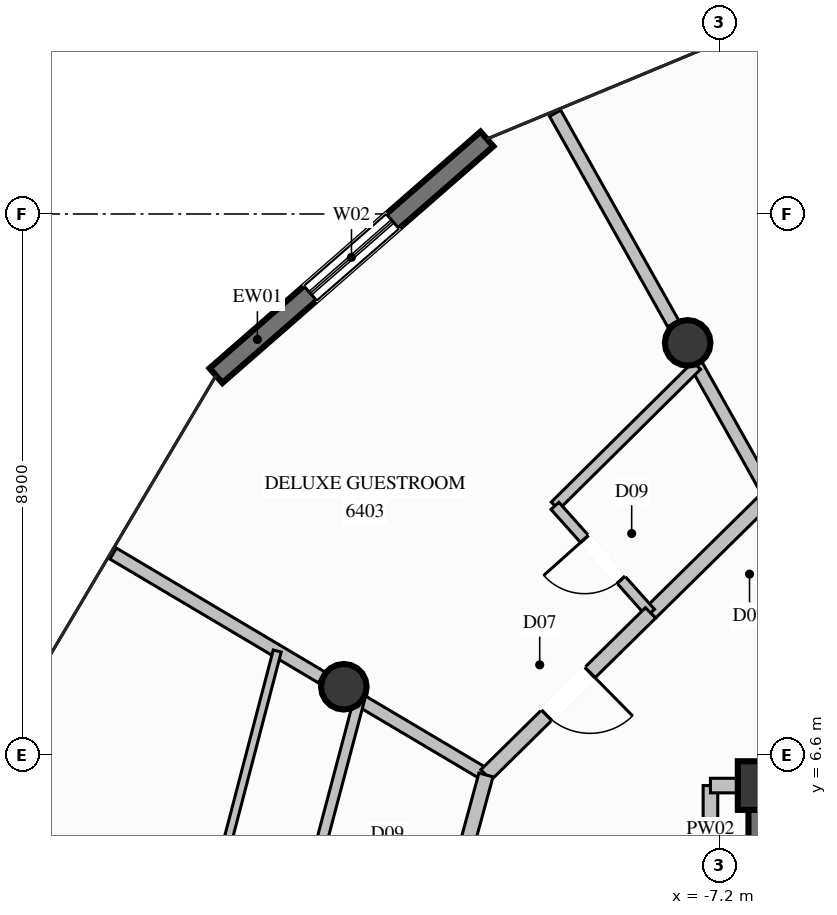
"""IFC4 building model, lengths in metres.
Left out: names, types, materials, properties, quantities, classifications, styles, units other than length and angle.
Written with IfcOpenShell. Run it as: python <this file> out.ifc"""

import sys

from ifc_helpers import new_model, si_unit, direction, frame, frame_2d, origin, origin_2d, place, context, subcontext, project, spatial, rectangle, circle, extrude, element, fill, save


model = new_model("IFC4")
c1 = context("Model", 3, precision=1e-05, world=origin(), true_north=direction((0.0, 1.0)))
c2 = subcontext(c1, "Body", "Model", "MODEL_VIEW")
j1 = project(units=[si_unit("LENGTHUNIT", "METRE"), si_unit("PLANEANGLEUNIT", "RADIAN")], contexts=[c1])
p1 = place(None, origin())
s1 = spatial("IfcSite", under=j1, at=p1, CompositionType="ELEMENT")
p2 = place(p1, origin())
s2 = spatial("IfcBuilding", under=s1, at=p2, CompositionType="ELEMENT")
p3 = place(p2, frame((0.0, 0.0, 239.2)))
s3 = spatial("IfcBuildingStorey", under=s2, at=p3, CompositionType="ELEMENT", Elevation=239.2)
p4 = place(p3, frame((-6.5, 6.1, 0.0), z_axis=(0.0, 0.0, 1.0), x_axis=(1.0, 0.0, 0.0)))
e1 = element("IfcColumn", 1, at=p4, inside=s3, PredefinedType="COLUMN", context=c2, shape_type="SweptSolid", body=[
    extrude(rectangle(XDim=0.8, YDim=0.8, at=origin_2d()), origin(), (0.0, 0.0, 1.0), 3.8),
])
p5 = place(p3, frame((-6.5, 2.35, 0.0), z_axis=(0.0, 0.0, 1.0), x_axis=(0.0, 1.0, 0.0)))
e2 = element("IfcWall", 2, at=p5, inside=s3, PredefinedType="SHEAR", context=c2, shape_type="SweptSolid", body=[
    extrude(rectangle(XDim=3.975, YDim=0.45, at=frame_2d((1.987, 0.0))), origin(), (0.0, 0.0, 1.0), 3.8),
])
for number, where, z_axis, x_axis in (
    (3, (-7.725, 13.38, 0.0), (0.0, 0.0, 1.0), (1.0, 0.0, 0.0)),
    (4, (-13.38, 7.725, 0.0), (0.0, 0.0, 1.0), (1.0, 0.0, 0.0)),
):
    element("IfcColumn", number, at=place(p3, frame(where, z_axis=z_axis, x_axis=x_axis)), inside=s3, PredefinedType="COLUMN", context=c2, shape_type="SweptSolid", body=[
        extrude(circle(Radius=0.375, at=origin_2d()), origin(), (0.0, 0.0, 1.0), 3.8),
    ])
p6 = place(p3, frame((-15.482, 12.842, 0.0), z_axis=(0.0, 0.0, 1.0), x_axis=(0.753261443664, 0.65772121563, 0.0)))
e5 = element("IfcWall", 5, at=p6, inside=s3, PredefinedType="SOLIDWALL", context=c2, shape_type="SweptSolid", body=[
    extrude(rectangle(XDim=5.916, YDim=0.32, at=frame_2d((2.958, 0.0))), origin(), (0.0, 0.0, 1.0), 3.57),
])
p7 = place(p6, frame((2.058, 0.0, 0.35)))
e6 = element("IfcOpeningElement", 6, at=p7, cuts=e5, PredefinedType="OPENING", context=c2, shape_type="SweptSolid", body=[
    extrude(rectangle(XDim=1.8, YDim=2.6, at=frame_2d((0.9, 1.3))), frame((0.0, 0.17, 0.0), z_axis=(0.0, -1.0, 0.0), x_axis=(1.0, 0.0, 0.0)), (0.0, 0.0, 1.0), 0.34),
])
p8 = place(p3, frame((-7.35, 4.95, 0.0), z_axis=(0.0, 0.0, 1.0), x_axis=(0.0, 1.0, 0.0)))
e7 = element("IfcWall", 7, at=p8, inside=s3, PredefinedType="PARTITIONING", context=c2, shape_type="SweptSolid", body=[
    extrude(rectangle(XDim=1.15, YDim=0.24, at=frame_2d((0.575, 0.0))), origin(), (0.0, 0.0, 1.0), 2.655),
])
p9 = place(p3, frame((-7.35, 6.1, 0.0), z_axis=(0.0, 0.0, 1.0), x_axis=(1.0, 0.0, 0.0)))
e8 = element("IfcWall", 8, at=p9, inside=s3, PredefinedType="PARTITIONING", context=c2, shape_type="SweptSolid", body=[
    extrude(rectangle(XDim=0.85, YDim=0.24, at=frame_2d((0.425, 0.0))), origin(), (0.0, 0.0, 1.0), 3.011),
])
p10 = place(p3, frame((-6.375, 10.869, 0.0), z_axis=(0.0, 0.0, 1.0), x_axis=(-0.489667191284, 0.871909422922, 0.0)))
e9 = element("IfcWall", 9, at=p10, inside=s3, PredefinedType="PARTITIONING", context=c2, shape_type="SweptSolid", body=[
    extrude(rectangle(XDim=2.459, YDim=0.21, at=frame_2d((1.229, 0.0))), origin(), (0.0, 0.0, 1.0), 3.011),
])
p11 = place(p3, frame((-7.962, 13.696, 0.0), z_axis=(0.0, 0.0, 1.0), x_axis=(-0.489665242016, 0.871910517634, 0.0)))
e10 = element("IfcWall", 10, at=p11, inside=s3, PredefinedType="PARTITIONING", context=c2, shape_type="SweptSolid", body=[
    extrude(rectangle(XDim=3.968, YDim=0.21, at=frame_2d((1.984, 0.0))), origin(), (0.0, 0.0, 1.0), 3.57),
])
p12 = place(p3, frame((-11.042, 6.275, 0.0), z_axis=(0.0, 0.0, 1.0), x_axis=(-0.859975377651, 0.510335526721, 0.0)))
e11 = element("IfcWall", 11, at=p12, inside=s3, PredefinedType="PARTITIONING", context=c2, shape_type="SweptSolid", body=[
    extrude(rectangle(XDim=2.359, YDim=0.21, at=frame_2d((1.18, 0.0))), origin(), (0.0, 0.0, 1.0), 3.011),
])
p13 = place(p3, frame((-13.744, 7.879, 0.0), z_axis=(0.0, 0.0, 1.0), x_axis=(-0.859849705024, 0.510547240488, 0.0)))
e12 = element("IfcWall", 12, at=p13, inside=s3, PredefinedType="PARTITIONING", context=c2, shape_type="SweptSolid", body=[
    extrude(rectangle(XDim=3.988, YDim=0.21, at=frame_2d((1.994, 0.0))), origin(), (0.0, 0.0, 1.0), 3.57),
])
p14 = place(p3, frame((-6.375, 10.869, 0.0), z_axis=(0.0, 0.0, 1.0), x_axis=(-0.712721806089, -0.701446809904, 0.0)))
e13 = element("IfcWall", 13, at=p14, inside=s3, PredefinedType="PARTITIONING", context=c2, shape_type="SweptSolid", body=[
    extrude(rectangle(XDim=2.75, YDim=0.24, at=frame_2d((1.375, 0.0))), origin(), (0.0, 0.0, 1.0), 3.57),
])
p15 = place(p3, frame((-7.575, 13.007, 0.0), z_axis=(0.0, 0.0, 1.0), x_axis=(-0.710892186869, -0.703301001456, 0.0)))
e14 = element("IfcWall", 14, at=p15, inside=s3, PredefinedType="PLUMBINGWALL", context=c2, shape_type="SweptSolid", body=[
    extrude(rectangle(XDim=3.281, YDim=0.175, at=frame_2d((1.64, 0.0))), origin(), (0.0, 0.0, 1.0), 3.139),
])
p16 = place(p3, frame((-8.335, 8.94, 0.0), z_axis=(0.0, 0.0, 1.0), x_axis=(-0.666153503552, 0.745814661766, 0.0)))
e15 = element("IfcWall", 15, at=p16, inside=s3, PredefinedType="PLUMBINGWALL", context=c2, shape_type="SweptSolid", body=[
    extrude(rectangle(XDim=2.36, YDim=0.175, at=frame_2d((1.18, 0.0))), origin(), (0.0, 0.0, 1.0), 3.57),
])
p17 = place(p16, frame((0.73, 0.0, 0.0)))
e16 = element("IfcOpeningElement", 16, at=p17, cuts=e15, PredefinedType="OPENING", context=c2, shape_type="SweptSolid", body=[
    extrude(rectangle(XDim=0.9, YDim=2.1, at=frame_2d((0.45, 1.05))), frame((0.0, 0.098, 0.0), z_axis=(0.0, -1.0, 0.0), x_axis=(1.0, 0.0, 0.0)), (0.0, 0.0, 1.0), 0.195),
])
p18 = place(p3, frame((-8.335, 8.94, 0.0), z_axis=(0.0, 0.0, 1.0), x_axis=(-0.712612295011, -0.701558063883, 0.0)))
e17 = element("IfcWall", 17, at=p18, inside=s3, PredefinedType="PARTITIONING", context=c2, shape_type="SweptSolid", body=[
    extrude(rectangle(XDim=3.799, YDim=0.24, at=frame_2d((1.899, 0.0))), origin(), (0.0, 0.0, 1.0), 3.57),
])
p19 = place(p18, frame((1.399, 0.0, 0.0)))
e18 = element("IfcOpeningElement", 18, at=p19, cuts=e17, PredefinedType="OPENING", context=c2, shape_type="SweptSolid", body=[
    extrude(rectangle(XDim=1.0, YDim=2.2, at=frame_2d((0.5, 1.1))), frame((0.0, 0.13, 0.0), z_axis=(0.0, -1.0, 0.0), x_axis=(1.0, 0.0, 0.0)), (0.0, 0.0, 1.0), 0.26),
])
p20 = place(p3, frame((-11.042, 6.275, 0.0), z_axis=(0.0, 0.0, 1.0), x_axis=(-0.262572701387, -0.964912211803, 0.0)))
e19 = element("IfcWall", 19, at=p20, inside=s3, PredefinedType="PARTITIONING", context=c2, shape_type="SweptSolid", body=[
    extrude(rectangle(XDim=2.731, YDim=0.24, at=frame_2d((1.365, 0.0))), origin(), (0.0, 0.0, 1.0), 3.57),
])
p21 = place(p3, frame((-13.127, 7.513, 0.0), z_axis=(0.0, 0.0, 1.0), x_axis=(-0.25555737321, -0.966793891684, 0.0)))
e20 = element("IfcWall", 20, at=p21, inside=s3, PredefinedType="PLUMBINGWALL", context=c2, shape_type="SweptSolid", body=[
    extrude(rectangle(XDim=3.263, YDim=0.175, at=frame_2d((1.632, 0.0))), origin(), (0.0, 0.0, 1.0), 3.139),
])
p22 = place(p3, frame((-14.475, 8.313, 0.0), z_axis=(0.0, 0.0, 1.0), x_axis=(-0.252565334536, -0.967579842592, 0.0)))
e21 = element("IfcWall", 21, at=p22, inside=s3, PredefinedType="PARTITIONING", context=c2, shape_type="SweptSolid", body=[
    extrude(rectangle(XDim=8.592, YDim=0.135, at=frame_2d((4.296, 0.0))), origin(), (0.0, 0.0, 1.0), 3.57),
])
p23 = place(p22, frame((3.821, 0.0, 0.0)))
e22 = element("IfcOpeningElement", 22, at=p23, cuts=e21, PredefinedType="OPENING", context=c2, shape_type="SweptSolid", body=[
    extrude(rectangle(XDim=0.95, YDim=2.1, at=frame_2d((0.475, 1.05))), frame((0.0, 0.078, 0.0), z_axis=(0.0, -1.0, 0.0), x_axis=(1.0, 0.0, 0.0)), (0.0, 0.0, 1.0), 0.155),
])
p24 = place(p7, origin())
e23 = element("IfcWindow", 23, at=p24, inside=s3, PartitioningType="SINGLE_PANEL", PredefinedType="WINDOW", context=c2, shape_type="SweptSolid", body=[
    extrude(rectangle(XDim=1.8, YDim=2.6, at=frame_2d((0.9, 1.3))), frame((0.0, 0.03, 0.0), z_axis=(0.0, -1.0, 0.0), x_axis=(1.0, 0.0, 0.0)), (0.0, 0.0, 1.0), 0.06),
])
fill(e6, e23)
p25 = place(p17, origin())
e24 = element("IfcDoor", 24, at=p25, inside=s3, OperationType="SINGLE_SWING_RIGHT", PredefinedType="DOOR", context=c2, shape_type="SweptSolid", body=[
    extrude(rectangle(XDim=0.9, YDim=2.1, at=frame_2d((0.45, 1.05))), frame((0.0, 0.025, 0.0), z_axis=(0.0, -1.0, 0.0), x_axis=(1.0, 0.0, 0.0)), (0.0, 0.0, 1.0), 0.05),
])
fill(e16, e24)
p26 = place(p19, origin())
e25 = element("IfcDoor", 25, at=p26, inside=s3, OperationType="SINGLE_SWING_LEFT", PredefinedType="DOOR", context=c2, shape_type="SweptSolid", body=[
    extrude(rectangle(XDim=1.0, YDim=2.2, at=frame_2d((0.5, 1.1))), frame((0.0, 0.025, 0.0), z_axis=(0.0, -1.0, 0.0), x_axis=(1.0, 0.0, 0.0)), (0.0, 0.0, 1.0), 0.05),
])
fill(e18, e25)
save(model, sys.argv[1])
